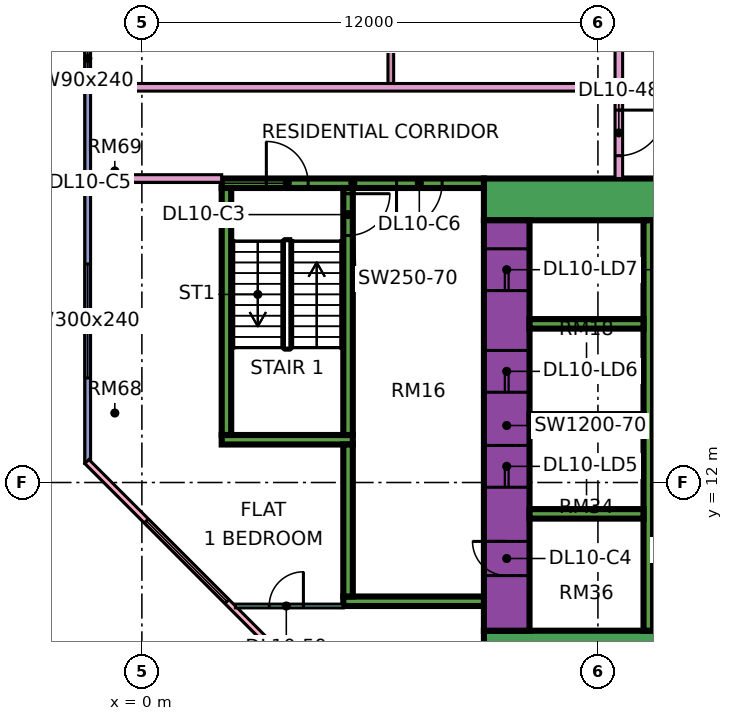
"""IFC4 building model, lengths in metres.
Left out: names, types, materials, properties, quantities, classifications, styles, units other than length and angle.
Written with IfcOpenShell. Run it as: python <this file> out.ifc"""

import sys

from ifc_helpers import new_model, si_unit, direction, frame, frame_2d, origin, place, context, subcontext, project, spatial, rectangle, extrude, element, fill, save


model = new_model("IFC4")
c1 = context("Model", 3, precision=1e-05, world=origin(), true_north=direction((0.0, 1.0)))
c2 = subcontext(c1, "Body", "Model", "MODEL_VIEW")
j1 = project(units=[si_unit("LENGTHUNIT", "METRE"), si_unit("PLANEANGLEUNIT", "RADIAN")], contexts=[c1])
p1 = place(None, origin())
s1 = spatial("IfcSite", under=j1, at=p1, CompositionType="ELEMENT")
p2 = place(p1, origin())
s2 = spatial("IfcBuilding", under=s1, at=p2, CompositionType="ELEMENT")
p3 = place(p2, frame((0.0, 0.0, 52.65)))
s3 = spatial("IfcBuildingStorey", under=s2, at=p3, CompositionType="ELEMENT", Elevation=52.65)
p4 = place(p3, frame((9.0, 7.55, 0.0), z_axis=(0.0, 0.0, 1.0), x_axis=(1.0, 0.0, 0.0)))
e1 = element("IfcWall", 1, at=p4, inside=s3, PredefinedType="SHEAR", context=c2, shape_type="SweptSolid", body=[
    extrude(rectangle(XDim=25.0, YDim=1.1, at=frame_2d((12.5, 0.0))), origin(), (0.0, 0.0, 1.0), 3.75),
])
p5 = place(p3, frame((9.0, 19.45, 0.0), z_axis=(0.0, 0.0, 1.0), x_axis=(1.0, 0.0, 0.0)))
e2 = element("IfcWall", 2, at=p5, inside=s3, PredefinedType="SHEAR", context=c2, shape_type="SweptSolid", body=[
    extrude(rectangle(XDim=25.0, YDim=1.1, at=frame_2d((12.5, 0.0))), origin(), (0.0, 0.0, 1.0), 3.75),
])
p6 = place(p5, frame((19.1, 0.0, 0.0)))
e3 = element("IfcOpeningElement", 3, at=p6, cuts=e2, PredefinedType="OPENING", context=c2, shape_type="SweptSolid", body=[
    extrude(rectangle(XDim=1.8, YDim=2.4, at=frame_2d((0.9, 1.2))), frame((0.0, 0.56, 0.0), z_axis=(0.0, -1.0, 0.0), x_axis=(1.0, 0.0, 0.0)), (0.0, 0.0, 1.0), 1.12),
])
p7 = place(p3, frame((9.6, 8.1, 0.0), z_axis=(0.0, 0.0, 1.0), x_axis=(0.0, 1.0, 0.0)))
e4 = element("IfcWall", 4, at=p7, inside=s3, PredefinedType="SHEAR", context=c2, shape_type="SweptSolid", body=[
    extrude(rectangle(XDim=10.8, YDim=1.2, at=frame_2d((5.4, 0.0))), origin(), (0.0, 0.0, 1.0), 3.75),
])
p8 = place(p7, frame((3.775, 0.0, 0.0)))
e5 = element("IfcOpeningElement", 5, at=p8, cuts=e4, PredefinedType="OPENING", context=c2, shape_type="SweptSolid", body=[
    extrude(rectangle(XDim=1.1, YDim=2.2, at=frame_2d((0.55, 1.1))), frame((0.0, 0.61, 0.0), z_axis=(0.0, -1.0, 0.0), x_axis=(1.0, 0.0, 0.0)), (0.0, 0.0, 1.0), 1.22),
])
p9 = place(p7, frame((6.275, 0.0, 0.0)))
e6 = element("IfcOpeningElement", 6, at=p9, cuts=e4, PredefinedType="OPENING", context=c2, shape_type="SweptSolid", body=[
    extrude(rectangle(XDim=1.1, YDim=2.2, at=frame_2d((0.55, 1.1))), frame((0.0, 0.61, 0.0), z_axis=(0.0, -1.0, 0.0), x_axis=(1.0, 0.0, 0.0)), (0.0, 0.0, 1.0), 1.22),
])
p10 = place(p7, frame((8.95, 0.0, 0.0)))
e7 = element("IfcOpeningElement", 7, at=p10, cuts=e4, PredefinedType="OPENING", context=c2, shape_type="SweptSolid", body=[
    extrude(rectangle(XDim=1.1, YDim=2.2, at=frame_2d((0.55, 1.1))), frame((0.0, 0.61, 0.0), z_axis=(0.0, -1.0, 0.0), x_axis=(1.0, 0.0, 0.0)), (0.0, 0.0, 1.0), 1.22),
])
p11 = place(p7, frame((1.45, 0.0, 0.0)))
e8 = element("IfcOpeningElement", 8, at=p11, cuts=e4, PredefinedType="OPENING", context=c2, shape_type="SweptSolid", body=[
    extrude(rectangle(XDim=0.9, YDim=2.1, at=frame_2d((0.45, 1.05))), frame((0.0, 0.61, 0.0), z_axis=(0.0, -1.0, 0.0), x_axis=(1.0, 0.0, 0.0)), (0.0, 0.0, 1.0), 1.22),
])
p12 = place(p3, frame((13.325, 8.1, 0.0), z_axis=(0.0, 0.0, 1.0), x_axis=(0.0, 1.0, 0.0)))
e9 = element("IfcWall", 9, at=p12, inside=s3, PredefinedType="SHEAR", context=c2, shape_type="SweptSolid", body=[
    extrude(rectangle(XDim=10.8, YDim=0.25, at=frame_2d((5.4, 0.0))), origin(), (0.0, 0.0, 1.0), 3.75),
])
p13 = place(p3, frame((13.45, 11.325, 0.0), z_axis=(0.0, 0.0, 1.0), x_axis=(1.0, 0.0, 0.0)))
e10 = element("IfcWall", 10, at=p13, inside=s3, PredefinedType="SHEAR", context=c2, shape_type="SweptSolid", body=[
    extrude(rectangle(XDim=19.45, YDim=0.25, at=frame_2d((9.725, 0.0))), origin(), (0.0, 0.0, 1.0), 3.75),
])
p14 = place(p13, frame((0.65, 0.0, 0.0)))
e11 = element("IfcOpeningElement", 11, at=p14, cuts=e10, PredefinedType="OPENING", context=c2, shape_type="SweptSolid", body=[
    extrude(rectangle(XDim=1.2, YDim=2.2, at=frame_2d((0.6, 1.1))), frame((0.0, 0.135, 0.0), z_axis=(0.0, -1.0, 0.0), x_axis=(1.0, 0.0, 0.0)), (0.0, 0.0, 1.0), 0.27),
])
p15 = place(p13, frame((3.4, 0.0, 0.0)))
e12 = element("IfcOpeningElement", 12, at=p15, cuts=e10, PredefinedType="OPENING", context=c2, shape_type="SweptSolid", body=[
    extrude(rectangle(XDim=1.2, YDim=2.2, at=frame_2d((0.6, 1.1))), frame((0.0, 0.135, 0.0), z_axis=(0.0, -1.0, 0.0), x_axis=(1.0, 0.0, 0.0)), (0.0, 0.0, 1.0), 0.27),
])
p16 = place(p13, frame((6.15, 0.0, 0.0)))
e13 = element("IfcOpeningElement", 13, at=p16, cuts=e10, PredefinedType="OPENING", context=c2, shape_type="SweptSolid", body=[
    extrude(rectangle(XDim=1.2, YDim=2.2, at=frame_2d((0.6, 1.1))), frame((0.0, 0.135, 0.0), z_axis=(0.0, -1.0, 0.0), x_axis=(1.0, 0.0, 0.0)), (0.0, 0.0, 1.0), 0.27),
])
p17 = place(p13, frame((8.9, 0.0, 0.0)))
e14 = element("IfcOpeningElement", 14, at=p17, cuts=e10, PredefinedType="OPENING", context=c2, shape_type="SweptSolid", body=[
    extrude(rectangle(XDim=1.2, YDim=2.2, at=frame_2d((0.6, 1.1))), frame((0.0, 0.135, 0.0), z_axis=(0.0, -1.0, 0.0), x_axis=(1.0, 0.0, 0.0)), (0.0, 0.0, 1.0), 0.27),
])
p18 = place(p3, frame((13.45, 15.675, 0.0), z_axis=(0.0, 0.0, 1.0), x_axis=(1.0, 0.0, 0.0)))
e15 = element("IfcWall", 15, at=p18, inside=s3, PredefinedType="SHEAR", context=c2, shape_type="SweptSolid", body=[
    extrude(rectangle(XDim=13.75, YDim=0.25, at=frame_2d((6.875, 0.0))), origin(), (0.0, 0.0, 1.0), 3.75),
])
for number, where, z_axis, x_axis in (
    (16, (10.2, 11.175, 0.0), (0.0, 0.0, 1.0), (1.0, 0.0, 0.0)),
    (17, (10.2, 13.675, 0.0), (0.0, 0.0, 1.0), (1.0, 0.0, 0.0)),
    (18, (10.2, 16.175, 0.0), (0.0, 0.0, 1.0), (1.0, 0.0, 0.0)),
):
    element("IfcWall", number, at=place(p3, frame(where, z_axis=z_axis, x_axis=x_axis)), inside=s3, PredefinedType="SHEAR", context=c2, shape_type="SweptSolid", body=[
        extrude(rectangle(XDim=3.0, YDim=0.25, at=frame_2d((1.5, 0.0))), origin(), (0.0, 0.0, 1.0), 3.75),
    ])
p19 = place(p3, frame((2.1, 19.875, 0.0), z_axis=(0.0, 0.0, 1.0), x_axis=(1.0, 0.0, 0.0)))
e19 = element("IfcWall", 19, at=p19, inside=s3, PredefinedType="SHEAR", context=c2, shape_type="SweptSolid", body=[
    extrude(rectangle(XDim=6.9, YDim=0.25, at=frame_2d((3.45, 0.0))), origin(), (0.0, 0.0, 1.0), 3.75),
])
p20 = place(p19, frame((1.175, 0.0, 0.0)))
e20 = element("IfcOpeningElement", 20, at=p20, cuts=e19, PredefinedType="OPENING", context=c2, shape_type="SweptSolid", body=[
    extrude(rectangle(XDim=1.1, YDim=2.2, at=frame_2d((0.55, 1.1))), frame((0.0, 0.135, 0.0), z_axis=(0.0, -1.0, 0.0), x_axis=(1.0, 0.0, 0.0)), (0.0, 0.0, 1.0), 0.27),
])
p21 = place(p19, frame((4.6, 0.0, 0.0)))
e21 = element("IfcOpeningElement", 21, at=p21, cuts=e19, PredefinedType="OPENING", context=c2, shape_type="SweptSolid", body=[
    extrude(rectangle(XDim=1.2, YDim=2.2, at=frame_2d((0.6, 1.1))), frame((0.0, 0.135, 0.0), z_axis=(0.0, -1.0, 0.0), x_axis=(1.0, 0.0, 0.0)), (0.0, 0.0, 1.0), 0.27),
])
p22 = place(p3, frame((2.1, 13.125, 0.0), z_axis=(0.0, 0.0, 1.0), x_axis=(1.0, 0.0, 0.0)))
e22 = element("IfcWall", 22, at=p22, inside=s3, PredefinedType="SHEAR", context=c2, shape_type="SweptSolid", body=[
    extrude(rectangle(XDim=3.45, YDim=0.25, at=frame_2d((1.725, 0.0))), origin(), (0.0, 0.0, 1.0), 3.75),
])
p23 = place(p3, frame((2.225, 13.25, 0.0), z_axis=(0.0, 0.0, 1.0), x_axis=(0.0, 1.0, 0.0)))
e23 = element("IfcWall", 23, at=p23, inside=s3, PredefinedType="SHEAR", context=c2, shape_type="SweptSolid", body=[
    extrude(rectangle(XDim=6.5, YDim=0.25, at=frame_2d((3.25, 0.0))), origin(), (0.0, 0.0, 1.0), 3.75),
])
p24 = place(p3, frame((5.425, 13.25, 0.0), z_axis=(0.0, 0.0, 1.0), x_axis=(0.0, 1.0, 0.0)))
e24 = element("IfcWall", 24, at=p24, inside=s3, PredefinedType="SHEAR", context=c2, shape_type="SweptSolid", body=[
    extrude(rectangle(XDim=6.5, YDim=0.25, at=frame_2d((3.25, 0.0))), origin(), (0.0, 0.0, 1.0), 3.75),
])
p25 = place(p24, frame((5.25, 0.0, 0.0)))
e25 = element("IfcOpeningElement", 25, at=p25, cuts=e24, PredefinedType="OPENING", context=c2, shape_type="SweptSolid", body=[
    extrude(rectangle(XDim=1.1, YDim=2.2, at=frame_2d((0.55, 1.1))), frame((0.0, 0.135, 0.0), z_axis=(0.0, -1.0, 0.0), x_axis=(1.0, 0.0, 0.0)), (0.0, 0.0, 1.0), 0.27),
])
p26 = place(p3, frame((5.3, 8.875, 0.0), z_axis=(0.0, 0.0, 1.0), x_axis=(1.0, 0.0, 0.0)))
e26 = element("IfcWall", 26, at=p26, inside=s3, PredefinedType="SHEAR", context=c2, shape_type="SweptSolid", body=[
    extrude(rectangle(XDim=3.7, YDim=0.25, at=frame_2d((1.85, 0.0))), origin(), (0.0, 0.0, 1.0), 3.75),
])
p27 = place(p3, frame((5.425, 9.0, 0.0), z_axis=(0.0, 0.0, 1.0), x_axis=(0.0, 1.0, 0.0)))
e27 = element("IfcWall", 27, at=p27, inside=s3, PredefinedType="SHEAR", context=c2, shape_type="SweptSolid", body=[
    extrude(rectangle(XDim=4.0, YDim=0.25, at=frame_2d((2.0, 0.0))), origin(), (0.0, 0.0, 1.0), 3.75),
])
p28 = place(p3, frame((-1.425, 23.925, 0.0), z_axis=(0.0, 0.0, 1.0), x_axis=(0.0, -1.0, 0.0)))
e28 = element("IfcWall", 28, at=p28, inside=s3, PredefinedType="SOLIDWALL", context=c2, shape_type="SweptSolid", body=[
    extrude(rectangle(XDim=11.425, YDim=0.15, at=frame_2d((5.712, 0.0))), origin(), (0.0, 0.0, 1.0), 3.35),
])
p29 = place(p28, frame((0.312, 0.0, 0.45)))
e29 = element("IfcOpeningElement", 29, at=p29, cuts=e28, PredefinedType="OPENING", context=c2, shape_type="SweptSolid", body=[
    extrude(rectangle(XDim=0.9, YDim=2.4, at=frame_2d((0.45, 1.2))), frame((0.0, 0.085, 0.0), z_axis=(0.0, -1.0, 0.0), x_axis=(1.0, 0.0, 0.0)), (0.0, 0.0, 1.0), 0.17),
])
p30 = place(p28, frame((6.175, 0.0, 0.45)))
e30 = element("IfcOpeningElement", 30, at=p30, cuts=e28, PredefinedType="OPENING", context=c2, shape_type="SweptSolid", body=[
    extrude(rectangle(XDim=3.0, YDim=2.4, at=frame_2d((1.5, 1.2))), frame((0.0, 0.085, 0.0), z_axis=(0.0, -1.0, 0.0), x_axis=(1.0, 0.0, 0.0)), (0.0, 0.0, 1.0), 0.17),
])
p31 = place(p3, frame((-1.447, 12.553, 0.0), z_axis=(0.0, 0.0, 1.0), x_axis=(0.707106781187, -0.707106781187, 0.0)))
e31 = element("IfcWall", 31, at=p31, inside=s3, PredefinedType="SOLIDWALL", context=c2, shape_type="SweptSolid", body=[
    extrude(rectangle(XDim=19.799, YDim=0.15, at=frame_2d((9.899, 0.0))), origin(), (0.0, 0.0, 1.0), 3.35),
])
p32 = place(p31, frame((2.212, 0.0, 0.45)))
e32 = element("IfcOpeningElement", 32, at=p32, cuts=e31, PredefinedType="OPENING", context=c2, shape_type="SweptSolid", body=[
    extrude(rectangle(XDim=3.0, YDim=2.4, at=frame_2d((1.5, 1.2))), frame((0.0, 0.085, 0.0), z_axis=(0.0, -1.0, 0.0), x_axis=(1.0, 0.0, 0.0)), (0.0, 0.0, 1.0), 0.17),
])
p33 = place(p31, frame((10.216, 0.0, 0.45)))
e33 = element("IfcOpeningElement", 33, at=p33, cuts=e31, PredefinedType="OPENING", context=c2, shape_type="SweptSolid", body=[
    extrude(rectangle(XDim=3.0, YDim=2.4, at=frame_2d((1.5, 1.2))), frame((0.0, 0.085, 0.0), z_axis=(0.0, -1.0, 0.0), x_axis=(1.0, 0.0, 0.0)), (0.0, 0.0, 1.0), 0.17),
])
p34 = place(p3, frame((-1.35, 20.0, 0.0), z_axis=(0.0, 0.0, 1.0), x_axis=(1.0, 0.0, 0.0)))
e34 = element("IfcWall", 34, at=p34, inside=s3, PredefinedType="PARTITIONING", context=c2, shape_type="SweptSolid", body=[
    extrude(rectangle(XDim=3.45, YDim=0.2, at=frame_2d((1.725, 0.0))), origin(), (0.0, 0.0, 1.0), 3.35),
])
p35 = place(p3, frame((-1.35, 22.4, 0.0), z_axis=(0.0, 0.0, 1.0), x_axis=(1.0, 0.0, 0.0)))
e35 = element("IfcWall", 35, at=p35, inside=s3, PredefinedType="PARTITIONING", context=c2, shape_type="SweptSolid", body=[
    extrude(rectangle(XDim=13.8, YDim=0.2, at=frame_2d((6.9, 0.0))), origin(), (0.0, 0.0, 1.0), 3.35),
])
p36 = place(p3, frame((2.461, 8.75, 0.0), z_axis=(0.0, 0.0, 1.0), x_axis=(1.0, 0.0, 0.0)))
e36 = element("IfcWall", 36, at=p36, inside=s3, PredefinedType="PARTITIONING", context=c2, shape_type="SweptSolid", body=[
    extrude(rectangle(XDim=2.839, YDim=0.1, at=frame_2d((1.419, 0.0))), origin(), (0.0, 0.0, 1.0), 3.35),
])
p37 = place(p36, frame((0.889, 0.0, 0.0)))
e37 = element("IfcOpeningElement", 37, at=p37, cuts=e36, PredefinedType="OPENING", context=c2, shape_type="SweptSolid", body=[
    extrude(rectangle(XDim=0.9, YDim=2.1, at=frame_2d((0.45, 1.05))), frame((0.0, 0.06, 0.0), z_axis=(0.0, -1.0, 0.0), x_axis=(1.0, 0.0, 0.0)), (0.0, 0.0, 1.0), 0.12),
])
p38 = place(p3, frame((6.55, 22.5, 0.0), z_axis=(0.0, 0.0, 1.0), x_axis=(0.0, 1.0, 0.0)))
e38 = element("IfcWall", 38, at=p38, inside=s3, PredefinedType="PARTITIONING", context=c2, shape_type="SweptSolid", body=[
    extrude(rectangle(XDim=10.55, YDim=0.15, at=frame_2d((5.275, 0.0))), origin(), (0.0, 0.0, 1.0), 3.35),
])
p39 = place(p38, frame((1.8, 0.0, 0.0)))
e39 = element("IfcOpeningElement", 39, at=p39, cuts=e38, PredefinedType="OPENING", context=c2, shape_type="SweptSolid", body=[
    extrude(rectangle(XDim=0.9, YDim=2.1, at=frame_2d((0.45, 1.05))), frame((0.0, 0.085, 0.0), z_axis=(0.0, -1.0, 0.0), x_axis=(1.0, 0.0, 0.0)), (0.0, 0.0, 1.0), 0.17),
])
p40 = place(p3, frame((12.55, 20.0, 0.0), z_axis=(0.0, 0.0, 1.0), x_axis=(0.0, 1.0, 0.0)))
e40 = element("IfcWall", 40, at=p40, inside=s3, PredefinedType="PARTITIONING", context=c2, shape_type="SweptSolid", body=[
    extrude(rectangle(XDim=19.0, YDim=0.2, at=frame_2d((9.5, 0.0))), origin(), (0.0, 0.0, 1.0), 3.35),
])
p41 = place(p40, frame((0.6, 0.0, 0.0)))
e41 = element("IfcOpeningElement", 41, at=p41, cuts=e40, PredefinedType="OPENING", context=c2, shape_type="SweptSolid", body=[
    extrude(rectangle(XDim=1.2, YDim=2.1, at=frame_2d((0.6, 1.05))), frame((0.0, 0.11, 0.0), z_axis=(0.0, -1.0, 0.0), x_axis=(1.0, 0.0, 0.0)), (0.0, 0.0, 1.0), 0.22),
])
p42 = place(p40, frame((4.65, 0.0, 0.0)))
e42 = element("IfcOpeningElement", 42, at=p42, cuts=e40, PredefinedType="OPENING", context=c2, shape_type="SweptSolid", body=[
    extrude(rectangle(XDim=1.0, YDim=2.1, at=frame_2d((0.5, 1.05))), frame((0.0, 0.11, 0.0), z_axis=(0.0, -1.0, 0.0), x_axis=(1.0, 0.0, 0.0)), (0.0, 0.0, 1.0), 0.22),
])
p43 = place(p29, origin())
e43 = element("IfcWindow", 43, at=p43, inside=s3, PartitioningType="SINGLE_PANEL", PredefinedType="WINDOW", context=c2, shape_type="SweptSolid", body=[
    extrude(rectangle(XDim=0.9, YDim=2.4, at=frame_2d((0.45, 1.2))), frame((0.0, 0.03, 0.0), z_axis=(0.0, -1.0, 0.0), x_axis=(1.0, 0.0, 0.0)), (0.0, 0.0, 1.0), 0.06),
])
fill(e29, e43)
p44 = place(p30, origin())
e44 = element("IfcWindow", 44, at=p44, inside=s3, PartitioningType="SINGLE_PANEL", PredefinedType="WINDOW", context=c2, shape_type="SweptSolid", body=[
    extrude(rectangle(XDim=3.0, YDim=2.4, at=frame_2d((1.5, 1.2))), frame((0.0, 0.03, 0.0), z_axis=(0.0, -1.0, 0.0), x_axis=(1.0, 0.0, 0.0)), (0.0, 0.0, 1.0), 0.06),
])
fill(e30, e44)
p45 = place(p32, origin())
e45 = element("IfcWindow", 45, at=p45, inside=s3, PartitioningType="SINGLE_PANEL", PredefinedType="WINDOW", context=c2, shape_type="SweptSolid", body=[
    extrude(rectangle(XDim=3.0, YDim=2.4, at=frame_2d((1.5, 1.2))), frame((0.0, 0.03, 0.0), z_axis=(0.0, -1.0, 0.0), x_axis=(1.0, 0.0, 0.0)), (0.0, 0.0, 1.0), 0.06),
])
fill(e32, e45)
p46 = place(p8, origin())
e46 = element("IfcDoor", 46, at=p46, inside=s3, OperationType="DOUBLE_DOOR_SLIDING", PredefinedType="DOOR", context=c2, shape_type="SweptSolid", body=[
    extrude(rectangle(XDim=1.1, YDim=2.2, at=frame_2d((0.55, 1.1))), frame((0.0, 0.025, 0.0), z_axis=(0.0, -1.0, 0.0), x_axis=(1.0, 0.0, 0.0)), (0.0, 0.0, 1.0), 0.05),
])
fill(e5, e46)
p47 = place(p9, origin())
e47 = element("IfcDoor", 47, at=p47, inside=s3, OperationType="DOUBLE_DOOR_SLIDING", PredefinedType="DOOR", context=c2, shape_type="SweptSolid", body=[
    extrude(rectangle(XDim=1.1, YDim=2.2, at=frame_2d((0.55, 1.1))), frame((0.0, 0.025, 0.0), z_axis=(0.0, -1.0, 0.0), x_axis=(1.0, 0.0, 0.0)), (0.0, 0.0, 1.0), 0.05),
])
fill(e6, e47)
p48 = place(p10, origin())
e48 = element("IfcDoor", 48, at=p48, inside=s3, OperationType="DOUBLE_DOOR_SLIDING", PredefinedType="DOOR", context=c2, shape_type="SweptSolid", body=[
    extrude(rectangle(XDim=1.1, YDim=2.2, at=frame_2d((0.55, 1.1))), frame((0.0, 0.025, 0.0), z_axis=(0.0, -1.0, 0.0), x_axis=(1.0, 0.0, 0.0)), (0.0, 0.0, 1.0), 0.05),
])
fill(e7, e48)
p49 = place(p25, origin())
e49 = element("IfcDoor", 49, at=p49, inside=s3, OperationType="SINGLE_SWING_RIGHT", PredefinedType="DOOR", context=c2, shape_type="SweptSolid", body=[
    extrude(rectangle(XDim=1.1, YDim=2.2, at=frame_2d((0.55, 1.1))), frame((0.0, 0.025, 0.0), z_axis=(0.0, -1.0, 0.0), x_axis=(1.0, 0.0, 0.0)), (0.0, 0.0, 1.0), 0.05),
])
fill(e25, e49)
p50 = place(p11, frame((0.9, 0.0, 0.0), z_axis=(0.0, 0.0, 1.0), x_axis=(-1.0, 0.0, 0.0)))
e50 = element("IfcDoor", 50, at=p50, inside=s3, OperationType="SINGLE_SWING_RIGHT", PredefinedType="DOOR", context=c2, shape_type="SweptSolid", body=[
    extrude(rectangle(XDim=0.9, YDim=2.1, at=frame_2d((0.45, 1.05))), frame((0.0, 0.025, 0.0), z_axis=(0.0, -1.0, 0.0), x_axis=(1.0, 0.0, 0.0)), (0.0, 0.0, 1.0), 0.05),
])
fill(e8, e50)
p51 = place(p20, origin())
e51 = element("IfcDoor", 51, at=p51, inside=s3, OperationType="SINGLE_SWING_LEFT", PredefinedType="DOOR", context=c2, shape_type="SweptSolid", body=[
    extrude(rectangle(XDim=1.1, YDim=2.2, at=frame_2d((0.55, 1.1))), frame((0.0, 0.025, 0.0), z_axis=(0.0, -1.0, 0.0), x_axis=(1.0, 0.0, 0.0)), (0.0, 0.0, 1.0), 0.05),
])
fill(e20, e51)
p52 = place(p21, frame((1.2, 0.0, 0.0), z_axis=(0.0, 0.0, 1.0), x_axis=(-1.0, 0.0, 0.0)))
e52 = element("IfcDoor", 52, at=p52, inside=s3, OperationType="SINGLE_SWING_LEFT", PredefinedType="DOOR", context=c2, shape_type="SweptSolid", body=[
    extrude(rectangle(XDim=1.2, YDim=2.2, at=frame_2d((0.6, 1.1))), frame((0.0, 0.025, 0.0), z_axis=(0.0, -1.0, 0.0), x_axis=(1.0, 0.0, 0.0)), (0.0, 0.0, 1.0), 0.05),
])
fill(e21, e52)
p53 = place(p41, origin())
e53 = element("IfcDoor", 53, at=p53, inside=s3, OperationType="SINGLE_SWING_RIGHT", PredefinedType="DOOR", context=c2, shape_type="SweptSolid", body=[
    extrude(rectangle(XDim=1.2, YDim=2.1, at=frame_2d((0.6, 1.05))), frame((0.0, 0.025, 0.0), z_axis=(0.0, -1.0, 0.0), x_axis=(1.0, 0.0, 0.0)), (0.0, 0.0, 1.0), 0.05),
])
fill(e41, e53)
p54 = place(p37, frame((0.9, 0.0, 0.0), z_axis=(0.0, 0.0, 1.0), x_axis=(-1.0, 0.0, 0.0)))
e54 = element("IfcDoor", 54, at=p54, inside=s3, OperationType="SINGLE_SWING_RIGHT", PredefinedType="DOOR", context=c2, shape_type="SweptSolid", body=[
    extrude(rectangle(XDim=0.9, YDim=2.1, at=frame_2d((0.45, 1.05))), frame((0.0, 0.025, 0.0), z_axis=(0.0, -1.0, 0.0), x_axis=(1.0, 0.0, 0.0)), (0.0, 0.0, 1.0), 0.05),
])
fill(e37, e54)
save(model, sys.argv[1])
